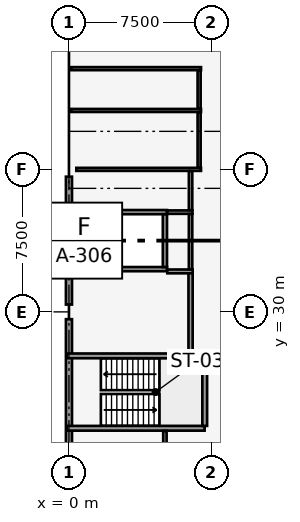
"""IFC4 building model, lengths in metres.
Left out: names, types, materials, properties, quantities, classifications, styles, units other than length and angle.
Written with IfcOpenShell. Run it as: python <this file> out.ifc"""

import sys

from ifc_helpers import new_model, si_unit, direction, frame, frame_2d, origin, origin_2d, place, context, subcontext, project, spatial, rectangle, circle, extrude, element, fill, save


model = new_model("IFC4")
c1 = context("Model", 3, precision=1e-05, world=origin(), true_north=direction((0.0, 1.0)))
c2 = subcontext(c1, "Body", "Model", "MODEL_VIEW")
j1 = project(units=[si_unit("LENGTHUNIT", "METRE"), si_unit("PLANEANGLEUNIT", "RADIAN")], contexts=[c1])
p1 = place(None, origin())
s1 = spatial("IfcSite", under=j1, at=p1, CompositionType="ELEMENT")
p2 = place(p1, origin())
s2 = spatial("IfcBuilding", under=s1, at=p2, CompositionType="ELEMENT")
p3 = place(p2, frame((0.0, 0.0, 4.8)))
s3 = spatial("IfcBuildingStorey", under=s2, at=p3, CompositionType="ELEMENT", Elevation=4.8)
for number, where, z_axis, x_axis in (
    (1, (0.0, 30.0, 0.0), (0.0, 0.0, 1.0), (1.0, 0.0, 0.0)),
    (2, (0.0, 37.5, 0.0), (0.0, 0.0, 1.0), (1.0, 0.0, 0.0)),
):
    element("IfcColumn", number, at=place(p3, frame(where, z_axis=z_axis, x_axis=x_axis)), inside=s3, PredefinedType="COLUMN", context=c2, shape_type="SweptSolid", body=[
        extrude(circle(Radius=0.375, at=origin_2d()), origin(), (0.0, 0.0, 1.0), 4.2),
    ])
for number, where, z_axis, x_axis in (
    (3, (0.0, 22.885, 0.0), (0.0, 0.0, 1.0), (0.0, 1.0, 0.0)),
    (4, (0.0, 30.385, 0.0), (0.0, 0.0, 1.0), (0.0, 1.0, 0.0)),
):
    element("IfcWall", number, at=place(p3, frame(where, z_axis=z_axis, x_axis=x_axis)), inside=s3, PredefinedType="SOLIDWALL", context=c2, shape_type="SweptSolid", body=[
        extrude(rectangle(XDim=6.73, YDim=0.32, at=frame_2d((3.365, 0.0))), origin(), (0.0, 0.0, 1.0), 2.89),
    ])
p4 = place(p3, frame((-0.12, 23.875, 0.0), z_axis=(0.0, 0.0, 1.0), x_axis=(1.0, 0.0, 0.0)))
e5 = element("IfcWall", 5, at=p4, inside=s3, PredefinedType="SOLIDWALL", context=c2, shape_type="SweptSolid", body=[
    extrude(rectangle(XDim=7.26, YDim=0.25, at=frame_2d((3.63, 0.0))), origin(), (0.0, 0.0, 1.0), 3.92),
])
p5 = place(p3, frame((-0.12, 27.685, 0.0), z_axis=(0.0, 0.0, 1.0), x_axis=(1.0, 0.0, 0.0)))
e6 = element("IfcWall", 6, at=p5, inside=s3, PredefinedType="SOLIDWALL", context=c2, shape_type="SweptSolid", body=[
    extrude(rectangle(XDim=7.26, YDim=0.25, at=frame_2d((3.63, 0.0))), origin(), (0.0, 0.0, 1.0), 3.92),
])
p6 = place(p5, frame((0.45, 0.0, 0.0)))
e7 = element("IfcOpeningElement", 7, at=p6, cuts=e6, PredefinedType="OPENING", context=c2, shape_type="SweptSolid", body=[
    extrude(rectangle(XDim=1.1, YDim=2.15, at=frame_2d((0.55, 1.075))), frame((0.0, 0.135, 0.0), z_axis=(0.0, -1.0, 0.0), x_axis=(1.0, 0.0, 0.0)), (0.0, 0.0, 1.0), 0.27),
])
p7 = place(p3, frame((7.145, 24.0, 0.0), z_axis=(0.0, 0.0, 1.0), x_axis=(0.0, 1.0, 0.0)))
e8 = element("IfcWall", 8, at=p7, inside=s3, PredefinedType="SOLIDWALL", context=c2, shape_type="SweptSolid", body=[
    extrude(rectangle(XDim=3.56, YDim=0.25, at=frame_2d((1.78, 0.0))), origin(), (0.0, 0.0, 1.0), 3.92),
])
p8 = place(p3, frame((2.34, 32.25, 0.0), z_axis=(0.0, 0.0, 1.0), x_axis=(1.0, 0.0, 0.0)))
e9 = element("IfcWall", 9, at=p8, inside=s3, PredefinedType="SOLIDWALL", context=c2, shape_type="SweptSolid", body=[
    extrude(rectangle(XDim=2.82, YDim=0.22, at=frame_2d((1.41, 0.0))), origin(), (0.0, 0.0, 1.0), 3.92),
])
p9 = place(p8, frame((0.86, 0.0, 0.0)))
e10 = element("IfcOpeningElement", 10, at=p9, cuts=e9, PredefinedType="OPENING", context=c2, shape_type="SweptSolid", body=[
    extrude(rectangle(XDim=1.1, YDim=2.15, at=frame_2d((0.55, 1.075))), frame((0.0, 0.12, 0.0), z_axis=(0.0, -1.0, 0.0), x_axis=(1.0, 0.0, 0.0)), (0.0, 0.0, 1.0), 0.24),
])
p10 = place(p3, frame((2.34, 35.25, 0.0), z_axis=(0.0, 0.0, 1.0), x_axis=(1.0, 0.0, 0.0)))
e11 = element("IfcWall", 11, at=p10, inside=s3, PredefinedType="SOLIDWALL", context=c2, shape_type="SweptSolid", body=[
    extrude(rectangle(XDim=2.82, YDim=0.22, at=frame_2d((1.41, 0.0))), origin(), (0.0, 0.0, 1.0), 3.92),
])
for number, where, z_axis, x_axis in (
    (12, (2.45, 32.36, 0.0), (0.0, 0.0, 1.0), (0.0, 1.0, 0.0)),
    (13, (5.05, 32.36, 0.0), (0.0, 0.0, 1.0), (0.0, 1.0, 0.0)),
):
    element("IfcWall", number, at=place(p3, frame(where, z_axis=z_axis, x_axis=x_axis)), inside=s3, PredefinedType="SOLIDWALL", context=c2, shape_type="SweptSolid", body=[
        extrude(rectangle(XDim=2.78, YDim=0.22, at=frame_2d((1.39, 0.0))), origin(), (0.0, 0.0, 1.0), 3.92),
    ])
p11 = place(p3, frame((6.4, 27.82, 0.0), z_axis=(0.0, 0.0, 1.0), x_axis=(0.0, 1.0, 0.0)))
e14 = element("IfcWall", 14, at=p11, inside=s3, PredefinedType="SOLIDWALL", context=c2, shape_type="SweptSolid", body=[
    extrude(rectangle(XDim=4.31, YDim=0.22, at=frame_2d((2.155, 0.0))), origin(), (0.0, 0.0, 1.0), 3.92),
])
p12 = place(p11, frame((0.45, 0.0, 0.0)))
e15 = element("IfcOpeningElement", 15, at=p12, cuts=e14, PredefinedType="OPENING", context=c2, shape_type="SweptSolid", body=[
    extrude(rectangle(XDim=1.1, YDim=2.15, at=frame_2d((0.55, 1.075))), frame((0.0, 0.12, 0.0), z_axis=(0.0, -1.0, 0.0), x_axis=(1.0, 0.0, 0.0)), (0.0, 0.0, 1.0), 0.24),
])
p13 = place(p3, frame((0.18, 32.13, 0.0), z_axis=(0.0, 0.0, 1.0), x_axis=(1.0, 0.0, 0.0)))
e16 = element("IfcWall", 16, at=p13, inside=s3, PredefinedType="PARTITIONING", context=c2, shape_type="SweptSolid", body=[
    extrude(rectangle(XDim=2.145, YDim=0.2, at=frame_2d((1.073, 0.0))), origin(), (0.0, 0.0, 1.0), 3.15),
])
p14 = place(p3, frame((5.175, 32.13, 0.0), z_axis=(0.0, 0.0, 1.0), x_axis=(1.0, 0.0, 0.0)))
e17 = element("IfcWall", 17, at=p14, inside=s3, PredefinedType="PARTITIONING", context=c2, shape_type="SweptSolid", body=[
    extrude(rectangle(XDim=1.335, YDim=0.2, at=frame_2d((0.667, 0.0))), origin(), (0.0, 0.0, 1.0), 3.6),
])
p15 = place(p3, frame((5.05, 20.274, 0.0), z_axis=(0.0, 0.0, 1.0), x_axis=(0.0, 1.0, 0.0)))
e18 = element("IfcWall", 18, at=p15, inside=s3, PredefinedType="PARTITIONING", context=c2, shape_type="SweptSolid", body=[
    extrude(rectangle(XDim=3.462, YDim=0.18, at=frame_2d((1.731, 0.0))), origin(), (0.0, 0.0, 1.0), 2.89),
])
p16 = place(p3, frame((0.174, 35.25, 0.0), z_axis=(0.0, 0.0, 1.0), x_axis=(1.0, 0.0, 0.0)))
e19 = element("IfcWall", 19, at=p16, inside=s3, PredefinedType="PARTITIONING", context=c2, shape_type="SweptSolid", body=[
    extrude(rectangle(XDim=2.166, YDim=0.18, at=frame_2d((1.083, 0.0))), origin(), (0.0, 0.0, 1.0), 3.14),
])
p17 = place(p3, frame((5.16, 35.25, 0.0), z_axis=(0.0, 0.0, 1.0), x_axis=(1.0, 0.0, 0.0)))
e20 = element("IfcWall", 20, at=p17, inside=s3, PredefinedType="PARTITIONING", context=c2, shape_type="SweptSolid", body=[
    extrude(rectangle(XDim=1.34, YDim=0.18, at=frame_2d((0.67, 0.0))), origin(), (0.0, 0.0, 1.0), 3.27),
])
p18 = place(p3, frame((0.389, 37.5, 0.0), z_axis=(0.0, 0.0, 1.0), x_axis=(1.0, 0.0, 0.0)))
e21 = element("IfcWall", 21, at=p18, inside=s3, PredefinedType="PARTITIONING", context=c2, shape_type="SweptSolid", body=[
    extrude(rectangle(XDim=6.561, YDim=0.16, at=frame_2d((3.281, 0.0))), origin(), (0.0, 0.0, 1.0), 2.89),
])
p19 = place(p3, frame((6.4, 32.244, 0.0), z_axis=(0.0, 0.0, 1.0), x_axis=(0.0, 1.0, 0.0)))
e22 = element("IfcWall", 22, at=p19, inside=s3, PredefinedType="PARTITIONING", context=c2, shape_type="SweptSolid", body=[
    extrude(rectangle(XDim=2.902, YDim=0.18, at=frame_2d((1.451, 0.0))), origin(), (0.0, 0.0, 1.0), 3.27),
])
p20 = place(p3, frame((6.4, 35.354, 0.0), z_axis=(0.0, 0.0, 1.0), x_axis=(0.0, 1.0, 0.0)))
e23 = element("IfcWall", 23, at=p20, inside=s3, PredefinedType="PARTITIONING", context=c2, shape_type="SweptSolid", body=[
    extrude(rectangle(XDim=2.052, YDim=0.18, at=frame_2d((1.026, 0.0))), origin(), (0.0, 0.0, 1.0), 2.89),
])
p21 = place(p20, frame((0.546, 0.0, 0.0)))
e24 = element("IfcOpeningElement", 24, at=p21, cuts=e23, PredefinedType="OPENING", context=c2, shape_type="SweptSolid", body=[
    extrude(rectangle(XDim=0.9, YDim=2.1, at=frame_2d((0.45, 1.05))), frame((0.0, 0.1, 0.0), z_axis=(0.0, -1.0, 0.0), x_axis=(1.0, 0.0, 0.0)), (0.0, 0.0, 1.0), 0.2),
])
for number, where, z_axis, x_axis in (
    (25, (0.112, 40.6, 0.0), (0.0, 0.0, 1.0), (1.0, 0.0, 0.0)),
    (26, (0.112, 42.8, 0.0), (0.0, 0.0, 1.0), (1.0, 0.0, 0.0)),
):
    element("IfcWall", number, at=place(p3, frame(where, z_axis=z_axis, x_axis=x_axis)), inside=s3, PredefinedType="PARTITIONING", context=c2, shape_type="SweptSolid", body=[
        extrude(rectangle(XDim=6.838, YDim=0.16, at=frame_2d((3.419, 0.0))), origin(), (0.0, 0.0, 1.0), 3.14),
    ])
p22 = place(p3, frame((6.85, 37.594, 0.0), z_axis=(0.0, 0.0, 1.0), x_axis=(0.0, 1.0, 0.0)))
e27 = element("IfcWall", 27, at=p22, inside=s3, PredefinedType="PARTITIONING", context=c2, shape_type="SweptSolid", body=[
    extrude(rectangle(XDim=2.912, YDim=0.16, at=frame_2d((1.456, 0.0))), origin(), (0.0, 0.0, 1.0), 2.89),
])
p23 = place(p22, frame((0.981, 0.0, 0.0)))
e28 = element("IfcOpeningElement", 28, at=p23, cuts=e27, PredefinedType="OPENING", context=c2, shape_type="SweptSolid", body=[
    extrude(rectangle(XDim=0.95, YDim=2.1, at=frame_2d((0.475, 1.05))), frame((0.0, 0.09, 0.0), z_axis=(0.0, -1.0, 0.0), x_axis=(1.0, 0.0, 0.0)), (0.0, 0.0, 1.0), 0.18),
])
p24 = place(p3, frame((6.85, 40.694, 0.0), z_axis=(0.0, 0.0, 1.0), x_axis=(0.0, 1.0, 0.0)))
e29 = element("IfcWall", 29, at=p24, inside=s3, PredefinedType="PARTITIONING", context=c2, shape_type="SweptSolid", body=[
    extrude(rectangle(XDim=2.012, YDim=0.16, at=frame_2d((1.006, 0.0))), origin(), (0.0, 0.0, 1.0), 3.27),
])
p25 = place(p24, frame((0.556, 0.0, 0.0)))
e30 = element("IfcOpeningElement", 30, at=p25, cuts=e29, PredefinedType="OPENING", context=c2, shape_type="SweptSolid", body=[
    extrude(rectangle(XDim=0.9, YDim=2.1, at=frame_2d((0.45, 1.05))), frame((0.0, 0.09, 0.0), z_axis=(0.0, -1.0, 0.0), x_axis=(1.0, 0.0, 0.0)), (0.0, 0.0, 1.0), 0.18),
])
p26 = place(p6, origin())
e31 = element("IfcDoor", 31, at=p26, inside=s3, OperationType="SINGLE_SWING_LEFT", PredefinedType="DOOR", context=c2, shape_type="SweptSolid", body=[
    extrude(rectangle(XDim=1.1, YDim=2.15, at=frame_2d((0.55, 1.075))), frame((0.0, 0.025, 0.0), z_axis=(0.0, -1.0, 0.0), x_axis=(1.0, 0.0, 0.0)), (0.0, 0.0, 1.0), 0.05),
])
fill(e7, e31)
p27 = place(p9, origin())
e32 = element("IfcDoor", 32, at=p27, inside=s3, OperationType="SLIDING_TO_LEFT", PredefinedType="DOOR", context=c2, shape_type="SweptSolid", body=[
    extrude(rectangle(XDim=1.1, YDim=2.15, at=frame_2d((0.55, 1.075))), frame((0.0, 0.025, 0.0), z_axis=(0.0, -1.0, 0.0), x_axis=(1.0, 0.0, 0.0)), (0.0, 0.0, 1.0), 0.05),
])
fill(e10, e32)
p28 = place(p12, origin())
e33 = element("IfcDoor", 33, at=p28, inside=s3, OperationType="SINGLE_SWING_LEFT", PredefinedType="DOOR", context=c2, shape_type="SweptSolid", body=[
    extrude(rectangle(XDim=1.1, YDim=2.15, at=frame_2d((0.55, 1.075))), frame((0.0, 0.025, 0.0), z_axis=(0.0, -1.0, 0.0), x_axis=(1.0, 0.0, 0.0)), (0.0, 0.0, 1.0), 0.05),
])
fill(e15, e33)
p29 = place(p21, origin())
e34 = element("IfcDoor", 34, at=p29, inside=s3, OperationType="SINGLE_SWING_RIGHT", PredefinedType="DOOR", context=c2, shape_type="SweptSolid", body=[
    extrude(rectangle(XDim=0.9, YDim=2.1, at=frame_2d((0.45, 1.05))), frame((0.0, 0.025, 0.0), z_axis=(0.0, -1.0, 0.0), x_axis=(1.0, 0.0, 0.0)), (0.0, 0.0, 1.0), 0.05),
])
fill(e24, e34)
p30 = place(p23, origin())
e35 = element("IfcDoor", 35, at=p30, inside=s3, OperationType="SINGLE_SWING_LEFT", PredefinedType="DOOR", context=c2, shape_type="SweptSolid", body=[
    extrude(rectangle(XDim=0.95, YDim=2.1, at=frame_2d((0.475, 1.05))), frame((0.0, 0.025, 0.0), z_axis=(0.0, -1.0, 0.0), x_axis=(1.0, 0.0, 0.0)), (0.0, 0.0, 1.0), 0.05),
])
fill(e28, e35)
p31 = place(p25, origin())
e36 = element("IfcDoor", 36, at=p31, inside=s3, OperationType="SINGLE_SWING_RIGHT", PredefinedType="DOOR", context=c2, shape_type="SweptSolid", body=[
    extrude(rectangle(XDim=0.9, YDim=2.1, at=frame_2d((0.45, 1.05))), frame((0.0, 0.025, 0.0), z_axis=(0.0, -1.0, 0.0), x_axis=(1.0, 0.0, 0.0)), (0.0, 0.0, 1.0), 0.05),
])
fill(e30, e36)
save(model, sys.argv[1])
